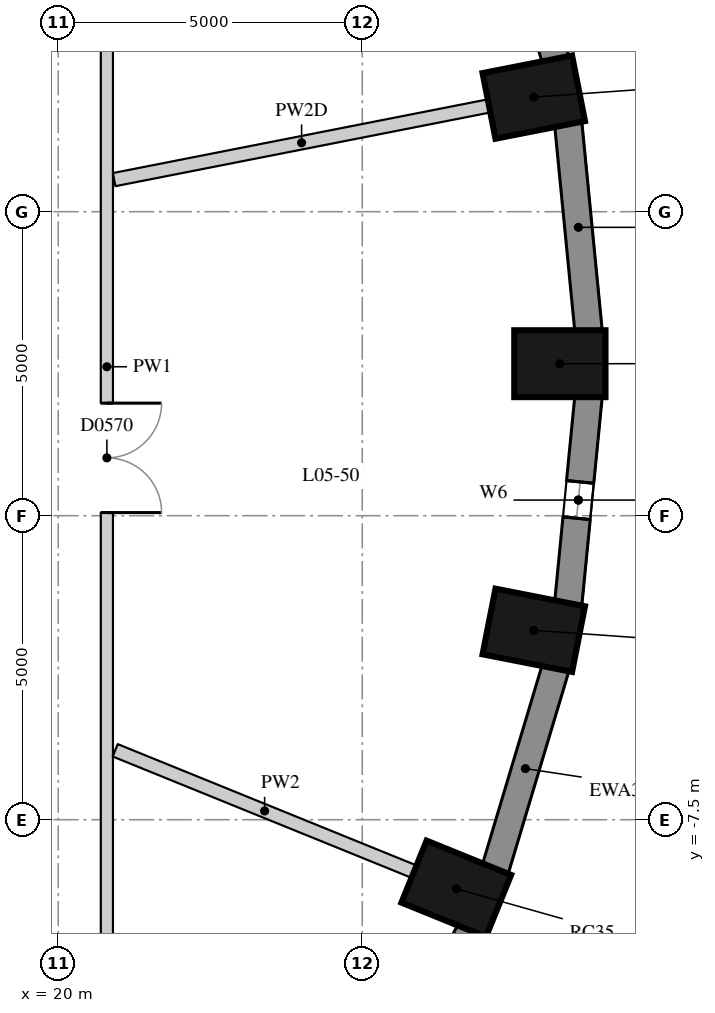
"""IFC4 building model, lengths in metres.
Left out: names, types, materials, properties, quantities, classifications, styles, units other than length and angle.
Written with IfcOpenShell. Run it as: python <this file> out.ifc"""

import sys

from ifc_helpers import new_model, si_unit, direction, frame, frame_2d, origin, origin_2d, place, context, subcontext, project, spatial, rectangle, extrude, element, fill, save


model = new_model("IFC4")
c1 = context("Model", 3, precision=1e-05, world=origin(), true_north=direction((0.0, 1.0)))
c2 = subcontext(c1, "Body", "Model", "MODEL_VIEW")
j1 = project(units=[si_unit("LENGTHUNIT", "METRE"), si_unit("PLANEANGLEUNIT", "RADIAN")], contexts=[c1])
p1 = place(None, origin())
s1 = spatial("IfcSite", under=j1, at=p1, CompositionType="ELEMENT")
p2 = place(p1, origin())
s2 = spatial("IfcBuilding", under=s1, at=p2, CompositionType="ELEMENT")
p3 = place(p2, frame((0.0, 0.0, 25.0)))
s3 = spatial("IfcBuildingStorey", under=s2, at=p3, CompositionType="ELEMENT", Elevation=25.0)
for number, where, z_axis, x_axis in (
    (1, (28.25, 0.0, 0.0), (0.0, 0.0, 1.0), (1.0, 0.0, 0.0)),
    (2, (27.821, 4.385, 0.0), (0.0, 0.0, 1.0), (0.981, 0.193, 0.0)),
    (3, (26.546, -8.636, 0.0), (0.0, 0.0, 1.0), (0.927, -0.376, 0.0)),
    (4, (27.821, -4.385, 0.0), (0.0, 0.0, 1.0), (0.981, -0.193, 0.0)),
):
    element("IfcColumn", number, at=place(p3, frame(where, z_axis=z_axis, x_axis=x_axis)), inside=s3, PredefinedType="COLUMN", context=c2, shape_type="SweptSolid", body=[
        extrude(rectangle(XDim=1.5, YDim=1.1, at=origin_2d()), origin(), (0.0, 0.0, 1.0), 3.3),
    ])
p4 = place(p3, frame((28.722, 0.53, 0.0), z_axis=(0.0, 0.0, 1.0), x_axis=(-0.097389581596, 0.995246336038, 0.0)))
e5 = element("IfcWall", 5, at=p4, inside=s3, PredefinedType="SOLIDWALL", context=c2, shape_type="SweptSolid", body=[
    extrude(rectangle(XDim=3.442, YDim=0.45, at=frame_2d((1.721, 0.0))), origin(), (0.0, 0.0, 1.0), 3.02),
])
p5 = place(p3, frame((28.182, 4.996, 0.0), z_axis=(0.0, 0.0, 1.0), x_axis=(-0.287064133733, 0.957911364963, 0.0)))
e6 = element("IfcWall", 6, at=p5, inside=s3, PredefinedType="SOLIDWALL", context=c2, shape_type="SweptSolid", body=[
    extrude(rectangle(XDim=3.473, YDim=0.45, at=frame_2d((1.737, 0.0))), origin(), (0.0, 0.0, 1.0), 3.02),
])
p6 = place(p5, frame((1.437, 0.0, 0.4)))
e7 = element("IfcOpeningElement", 7, at=p6, cuts=e6, PredefinedType="OPENING", context=c2, shape_type="SweptSolid", body=[
    extrude(rectangle(XDim=0.6, YDim=1.75, at=frame_2d((0.3, 0.875))), frame((0.0, 0.235, 0.0), z_axis=(0.0, -1.0, 0.0), x_axis=(1.0, 0.0, 0.0)), (0.0, 0.0, 1.0), 0.47),
])
p7 = place(p3, frame((25.152, -12.437, 0.0), z_axis=(0.0, 0.0, 1.0), x_axis=(0.462492775226, 0.886623050041, 0.0)))
e8 = element("IfcWall", 8, at=p7, inside=s3, PredefinedType="SOLIDWALL", context=c2, shape_type="SweptSolid", body=[
    extrude(rectangle(XDim=3.532, YDim=0.45, at=frame_2d((1.766, 0.0))), origin(), (0.0, 0.0, 1.0), 3.02),
])
p8 = place(p7, frame((1.466, 0.0, 0.4)))
e9 = element("IfcOpeningElement", 9, at=p8, cuts=e8, PredefinedType="OPENING", context=c2, shape_type="SweptSolid", body=[
    extrude(rectangle(XDim=0.6, YDim=1.75, at=frame_2d((0.3, 0.875))), frame((0.0, 0.235, 0.0), z_axis=(0.0, -1.0, 0.0), x_axis=(1.0, 0.0, 0.0)), (0.0, 0.0, 1.0), 0.47),
])
p9 = place(p3, frame((27.185, -8.323, 0.0), z_axis=(0.0, 0.0, 1.0), x_axis=(0.287064133733, 0.957911364963, 0.0)))
e10 = element("IfcWall", 10, at=p9, inside=s3, PredefinedType="SOLIDWALL", context=c2, shape_type="SweptSolid", body=[
    extrude(rectangle(XDim=3.473, YDim=0.45, at=frame_2d((1.737, 0.0))), origin(), (0.0, 0.0, 1.0), 3.02),
])
p10 = place(p3, frame((28.387, -3.956, 0.0), z_axis=(0.0, 0.0, 1.0), x_axis=(0.097389581596, 0.995246336038, 0.0)))
e11 = element("IfcWall", 11, at=p10, inside=s3, PredefinedType="SOLIDWALL", context=c2, shape_type="SweptSolid", body=[
    extrude(rectangle(XDim=3.442, YDim=0.45, at=frame_2d((1.721, 0.0))), origin(), (0.0, 0.0, 1.0), 3.02),
])
p11 = place(p10, frame((1.421, 0.0, 0.4)))
e12 = element("IfcOpeningElement", 12, at=p11, cuts=e11, PredefinedType="OPENING", context=c2, shape_type="SweptSolid", body=[
    extrude(rectangle(XDim=0.6, YDim=1.75, at=frame_2d((0.3, 0.875))), frame((0.0, 0.235, 0.0), z_axis=(0.0, -1.0, 0.0), x_axis=(1.0, 0.0, 0.0)), (0.0, 0.0, 1.0), 0.47),
])
p12 = place(p3, frame((20.8, 13.5, 0.0), z_axis=(0.0, 0.0, 1.0), x_axis=(0.0, -1.0, 0.0)))
e13 = element("IfcWall", 13, at=p12, inside=s3, PredefinedType="PARTITIONING", context=c2, shape_type="SweptSolid", body=[
    extrude(rectangle(XDim=27.1, YDim=0.2, at=frame_2d((13.55, 0.0))), origin(), (0.0, 0.0, 1.0), 3.02),
])
p13 = place(p12, frame((14.149, 0.0, 0.0)))
e14 = element("IfcOpeningElement", 14, at=p13, cuts=e13, PredefinedType="OPENING", context=c2, shape_type="SweptSolid", body=[
    extrude(rectangle(XDim=1.8, YDim=2.1, at=frame_2d((0.9, 1.05))), frame((0.0, 0.11, 0.0), z_axis=(0.0, -1.0, 0.0), x_axis=(1.0, 0.0, 0.0)), (0.0, 0.0, 1.0), 0.22),
])
p14 = place(p12, frame((5.864, 0.0, 0.0)))
e15 = element("IfcOpeningElement", 15, at=p14, cuts=e13, PredefinedType="OPENING", context=c2, shape_type="SweptSolid", body=[
    extrude(rectangle(XDim=1.8, YDim=2.1, at=frame_2d((0.9, 1.05))), frame((0.0, 0.11, 0.0), z_axis=(0.0, -1.0, 0.0), x_axis=(1.0, 0.0, 0.0)), (0.0, 0.0, 1.0), 0.22),
])
p15 = place(p3, frame((27.085, 4.24, 0.0), z_axis=(0.0, 0.0, 1.0), x_axis=(-0.981207724218, -0.192954403772, 0.0)))
e16 = element("IfcWall", 16, at=p15, inside=s3, PredefinedType="PARTITIONING", context=c2, shape_type="SweptSolid", body=[
    extrude(rectangle(XDim=6.283, YDim=0.22, at=frame_2d((3.142, 0.0))), origin(), (0.0, 0.0, 1.0), 2.47),
])
p16 = place(p3, frame((25.851, -8.354, 0.0), z_axis=(0.0, 0.0, 1.0), x_axis=(-0.926546814299, 0.376179479653, 0.0)))
e17 = element("IfcWall", 17, at=p16, inside=s3, PredefinedType="PARTITIONING", context=c2, shape_type="SweptSolid", body=[
    extrude(rectangle(XDim=5.304, YDim=0.22, at=frame_2d((2.652, 0.0))), origin(), (0.0, 0.0, 1.0), 3.02),
])
p17 = place(p11, origin())
e18 = element("IfcWindow", 18, at=p17, inside=s3, PartitioningType="SINGLE_PANEL", PredefinedType="WINDOW", context=c2, shape_type="SweptSolid", body=[
    extrude(rectangle(XDim=0.6, YDim=1.75, at=frame_2d((0.3, 0.875))), frame((0.0, 0.035, 0.0), z_axis=(0.0, -1.0, 0.0), x_axis=(1.0, 0.0, 0.0)), (0.0, 0.0, 1.0), 0.06),
])
fill(e12, e18)
p18 = place(p13, origin())
e19 = element("IfcDoor", 19, at=p18, inside=s3, OperationType="DOUBLE_DOOR_SINGLE_SWING", PredefinedType="DOOR", context=c2, shape_type="SweptSolid", body=[
    extrude(rectangle(XDim=1.8, YDim=2.1, at=frame_2d((0.9, 1.05))), frame((0.0, 0.025, 0.0), z_axis=(0.0, -1.0, 0.0), x_axis=(1.0, 0.0, 0.0)), (0.0, 0.0, 1.0), 0.05),
])
fill(e14, e19)
save(model, sys.argv[1])
